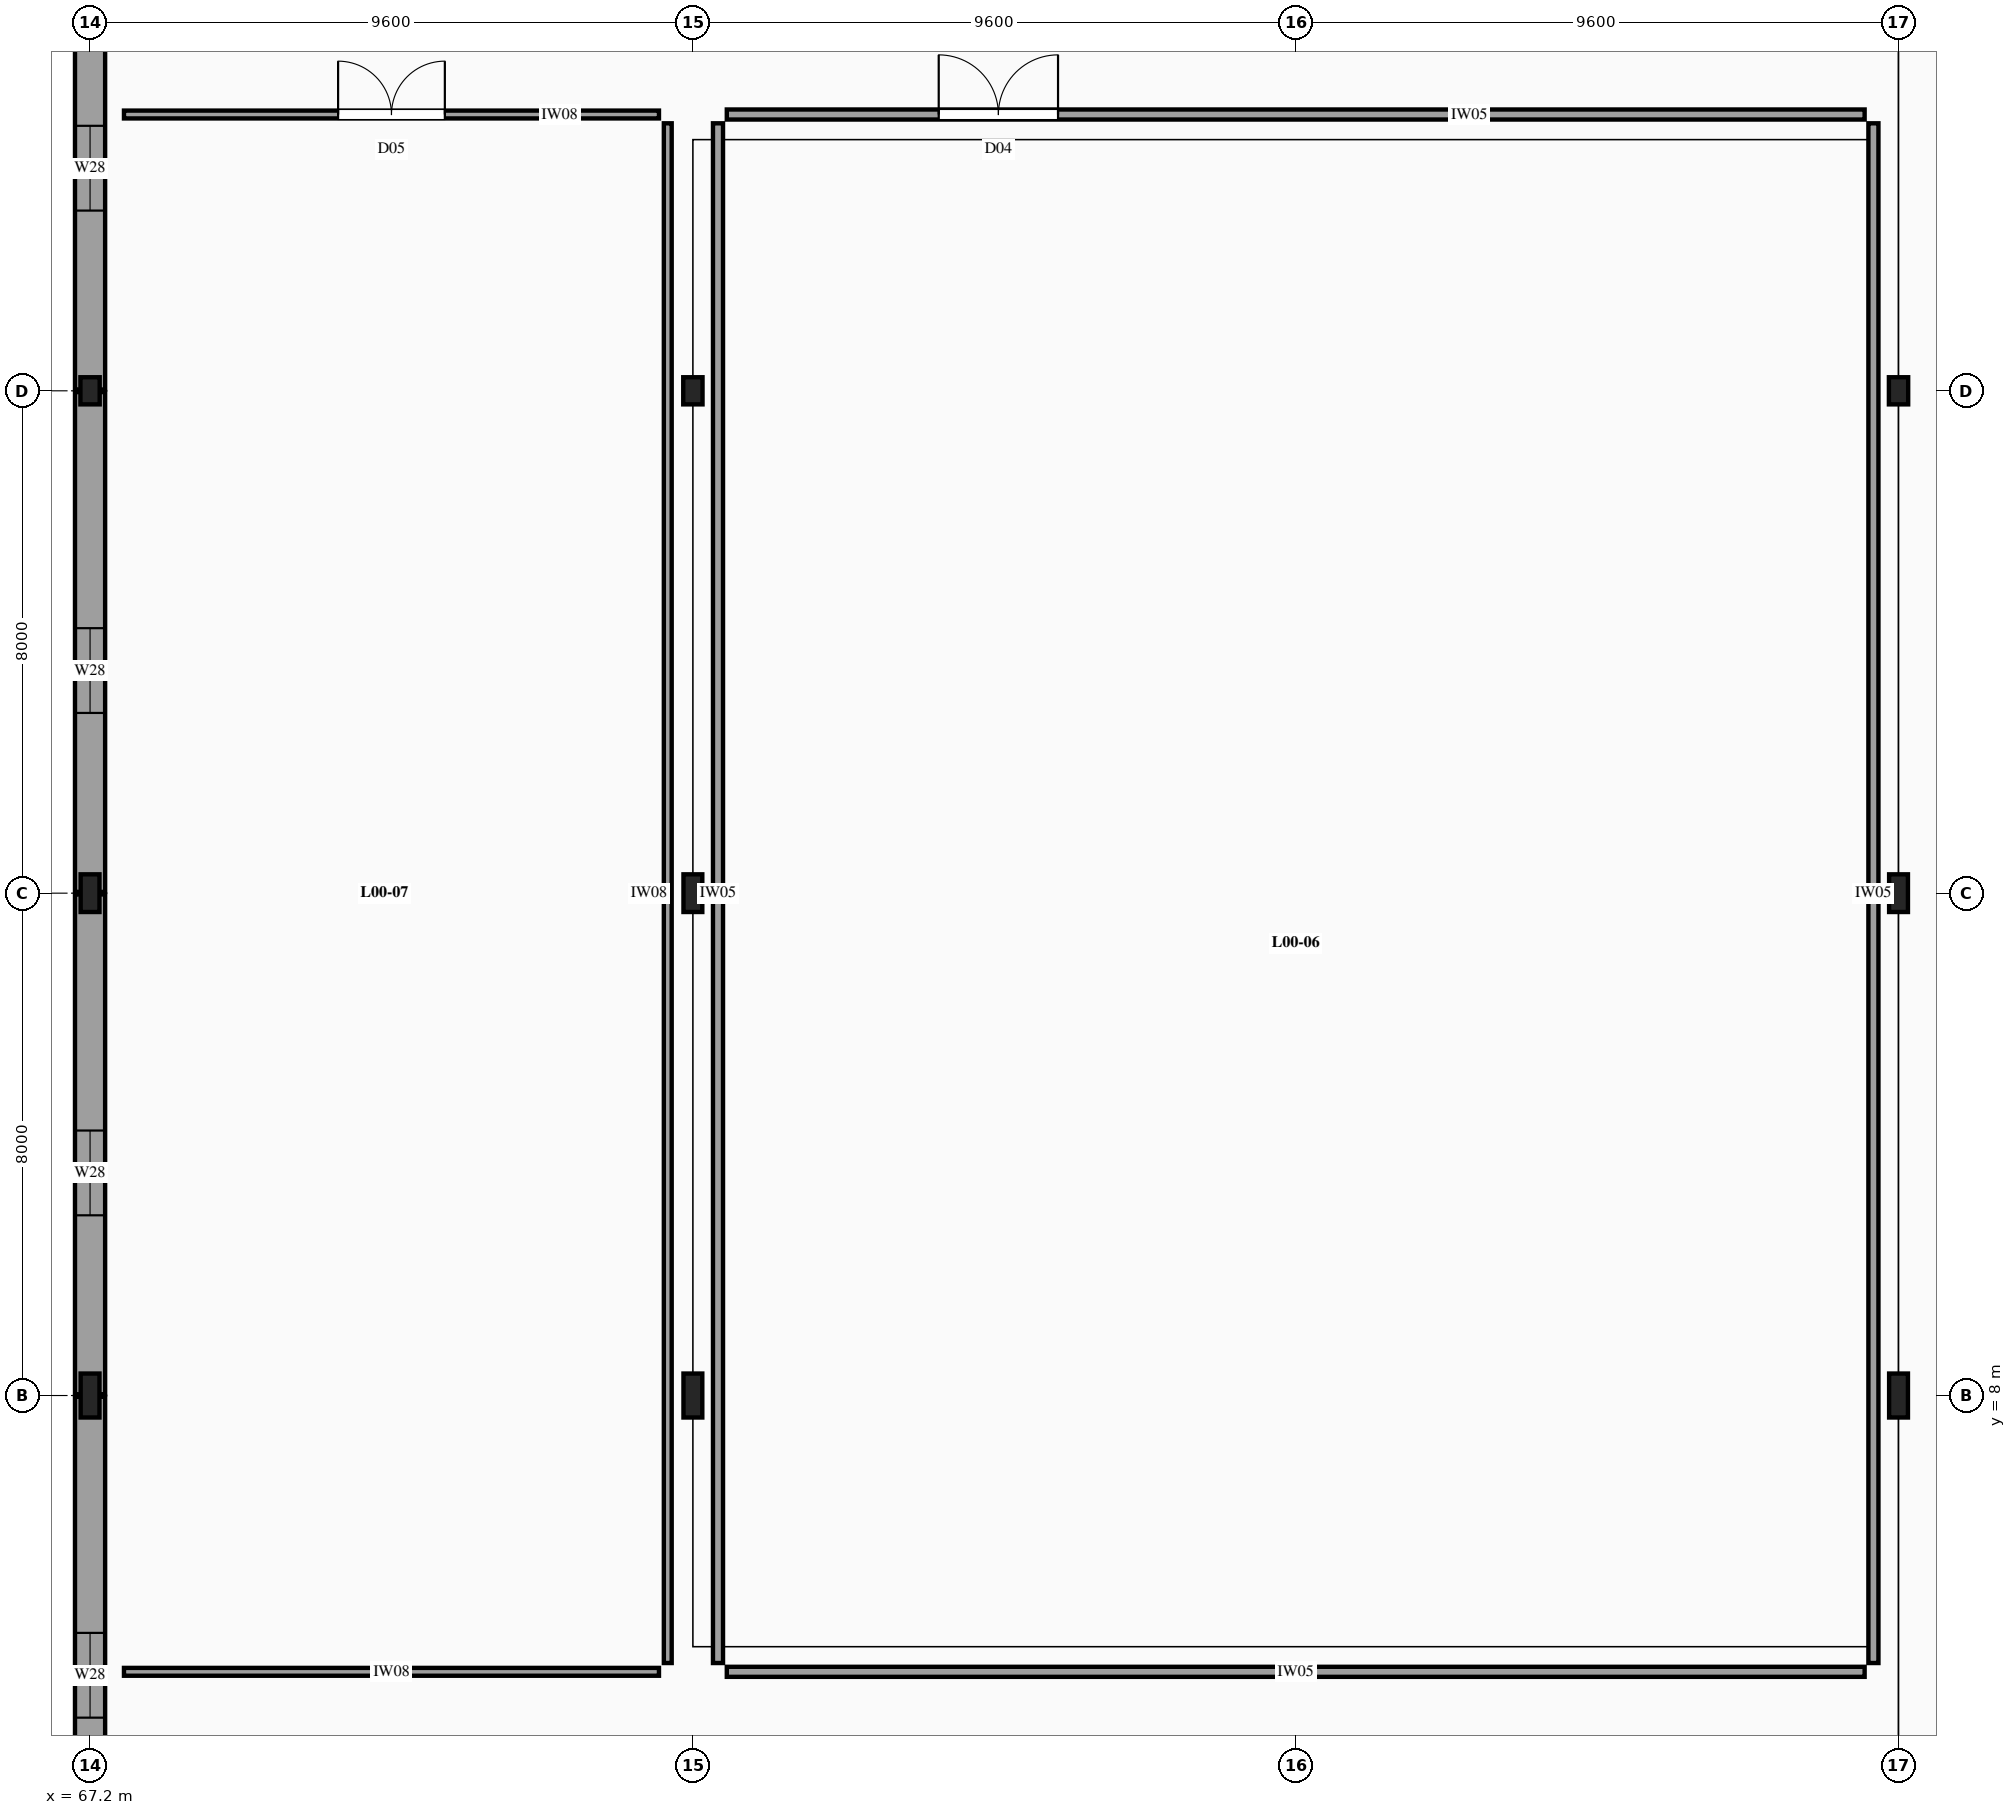
"""IFC4 building model, lengths in metres.
Left out: names, types, materials, properties, quantities, classifications, styles, units other than length and angle.
Written with IfcOpenShell. Run it as: python <this file> out.ifc"""

import sys

from ifc_helpers import new_model, si_unit, direction, frame, frame_2d, origin, origin_2d, place, context, subcontext, project, spatial, rectangle, i_section, extrude, element, fill, save


model = new_model("IFC4")
c1 = context("Model", 3, precision=1e-05, world=origin(), true_north=direction((0.0, 1.0)))
c2 = subcontext(c1, "Body", "Model", "MODEL_VIEW")
j1 = project(units=[si_unit("LENGTHUNIT", "METRE"), si_unit("PLANEANGLEUNIT", "RADIAN")], contexts=[c1])
p1 = place(None, origin())
s1 = spatial("IfcSite", under=j1, at=p1, CompositionType="ELEMENT")
p2 = place(p1, origin())
s2 = spatial("IfcBuilding", under=s1, at=p2, CompositionType="ELEMENT")
p3 = place(p2, origin())
s3 = spatial("IfcBuildingStorey", under=s2, at=p3, CompositionType="ELEMENT", Elevation=0.0)
p4 = place(p3, frame((67.2, 8.0, -0.28), z_axis=(0.0, 0.0, 1.0), x_axis=(1.0, 0.0, 0.0)))
e1 = element("IfcColumn", 1, at=p4, inside=s3, PredefinedType="COLUMN", context=c2, shape_type="SweptSolid", body=[
    extrude(i_section(OverallWidth=0.3, OverallDepth=0.7, WebThickness=0.017, FlangeThickness=0.032, FilletRadius=0.027, at=origin_2d()), origin(), (0.0, 0.0, 1.0), 4.52),
])
p5 = place(p3, frame((67.2, 16.0, -0.28), z_axis=(0.0, 0.0, 1.0), x_axis=(1.0, 0.0, 0.0)))
e2 = element("IfcColumn", 2, at=p5, inside=s3, PredefinedType="COLUMN", context=c2, shape_type="SweptSolid", body=[
    extrude(i_section(OverallWidth=0.3, OverallDepth=0.6, WebThickness=0.015, FlangeThickness=0.03, FilletRadius=0.027, at=origin_2d()), origin(), (0.0, 0.0, 1.0), 4.52),
])
p6 = place(p3, frame((67.2, 24.0, -0.28), z_axis=(0.0, 0.0, 1.0), x_axis=(1.0, 0.0, 0.0)))
e3 = element("IfcColumn", 3, at=p6, inside=s3, PredefinedType="COLUMN", context=c2, shape_type="SweptSolid", body=[
    extrude(i_section(OverallWidth=0.307, OverallDepth=0.432, WebThickness=0.021, FlangeThickness=0.04, FilletRadius=0.027, at=origin_2d()), origin(), (0.0, 0.0, 1.0), 4.52),
])
p7 = place(p3, frame((76.8, 8.0, -0.28), z_axis=(0.0, 0.0, 1.0), x_axis=(1.0, 0.0, 0.0)))
e4 = element("IfcColumn", 4, at=p7, inside=s3, PredefinedType="COLUMN", context=c2, shape_type="SweptSolid", body=[
    extrude(i_section(OverallWidth=0.3, OverallDepth=0.7, WebThickness=0.017, FlangeThickness=0.032, FilletRadius=0.027, at=origin_2d()), origin(), (0.0, 0.0, 1.0), 4.52),
])
p8 = place(p3, frame((76.8, 16.0, -0.28), z_axis=(0.0, 0.0, 1.0), x_axis=(1.0, 0.0, 0.0)))
e5 = element("IfcColumn", 5, at=p8, inside=s3, PredefinedType="COLUMN", context=c2, shape_type="SweptSolid", body=[
    extrude(i_section(OverallWidth=0.3, OverallDepth=0.6, WebThickness=0.015, FlangeThickness=0.03, FilletRadius=0.027, at=origin_2d()), origin(), (0.0, 0.0, 1.0), 4.52),
])
p9 = place(p3, frame((76.8, 24.0, -0.28), z_axis=(0.0, 0.0, 1.0), x_axis=(1.0, 0.0, 0.0)))
e6 = element("IfcColumn", 6, at=p9, inside=s3, PredefinedType="COLUMN", context=c2, shape_type="SweptSolid", body=[
    extrude(i_section(OverallWidth=0.307, OverallDepth=0.432, WebThickness=0.021, FlangeThickness=0.04, FilletRadius=0.027, at=origin_2d()), origin(), (0.0, 0.0, 1.0), 4.52),
])
p10 = place(p3, frame((96.0, 8.0, -0.28), z_axis=(0.0, 0.0, 1.0), x_axis=(1.0, 0.0, 0.0)))
e7 = element("IfcColumn", 7, at=p10, inside=s3, PredefinedType="COLUMN", context=c2, shape_type="SweptSolid", body=[
    extrude(i_section(OverallWidth=0.3, OverallDepth=0.7, WebThickness=0.017, FlangeThickness=0.032, FilletRadius=0.027, at=origin_2d()), origin(), (0.0, 0.0, 1.0), 4.52),
])
p11 = place(p3, frame((96.0, 16.0, -0.28), z_axis=(0.0, 0.0, 1.0), x_axis=(1.0, 0.0, 0.0)))
e8 = element("IfcColumn", 8, at=p11, inside=s3, PredefinedType="COLUMN", context=c2, shape_type="SweptSolid", body=[
    extrude(i_section(OverallWidth=0.3, OverallDepth=0.6, WebThickness=0.015, FlangeThickness=0.03, FilletRadius=0.027, at=origin_2d()), origin(), (0.0, 0.0, 1.0), 4.52),
])
p12 = place(p3, frame((96.0, 24.0, -0.28), z_axis=(0.0, 0.0, 1.0), x_axis=(1.0, 0.0, 0.0)))
e9 = element("IfcColumn", 9, at=p12, inside=s3, PredefinedType="COLUMN", context=c2, shape_type="SweptSolid", body=[
    extrude(i_section(OverallWidth=0.307, OverallDepth=0.432, WebThickness=0.021, FlangeThickness=0.04, FilletRadius=0.027, at=origin_2d()), origin(), (0.0, 0.0, 1.0), 4.52),
])
p13 = place(p3, frame((67.2, 0.02, 0.0), z_axis=(0.0, 0.0, 1.0), x_axis=(0.0, 1.0, 0.0)))
e10 = element("IfcWall", 10, at=p13, inside=s3, PredefinedType="SOLIDWALL", context=c2, shape_type="SweptSolid", body=[
    extrude(rectangle(XDim=7.96, YDim=0.48, at=frame_2d((3.98, 0.0))), origin(), (0.0, 0.0, 1.0), 3.56),
])
p14 = place(p13, frame((2.85, 0.0, 0.72)))
e11 = element("IfcOpeningElement", 11, at=p14, cuts=e10, PredefinedType="OPENING", context=c2, shape_type="SweptSolid", body=[
    extrude(rectangle(XDim=1.35, YDim=1.7, at=frame_2d((0.675, 0.85))), frame((0.0, 0.25, 0.0), z_axis=(0.0, -1.0, 0.0), x_axis=(1.0, 0.0, 0.0)), (0.0, 0.0, 1.0), 0.5),
])
p15 = place(p3, frame((67.2, 8.02, 0.0), z_axis=(0.0, 0.0, 1.0), x_axis=(0.0, 1.0, 0.0)))
e12 = element("IfcWall", 12, at=p15, inside=s3, PredefinedType="SOLIDWALL", context=c2, shape_type="SweptSolid", body=[
    extrude(rectangle(XDim=7.96, YDim=0.48, at=frame_2d((3.98, 0.0))), origin(), (0.0, 0.0, 1.0), 3.56),
])
p16 = place(p15, frame((2.85, 0.0, 0.72)))
e13 = element("IfcOpeningElement", 13, at=p16, cuts=e12, PredefinedType="OPENING", context=c2, shape_type="SweptSolid", body=[
    extrude(rectangle(XDim=1.35, YDim=1.7, at=frame_2d((0.675, 0.85))), frame((0.0, 0.25, 0.0), z_axis=(0.0, -1.0, 0.0), x_axis=(1.0, 0.0, 0.0)), (0.0, 0.0, 1.0), 0.5),
])
p17 = place(p3, frame((67.2, 16.02, 0.0), z_axis=(0.0, 0.0, 1.0), x_axis=(0.0, 1.0, 0.0)))
e14 = element("IfcWall", 14, at=p17, inside=s3, PredefinedType="SOLIDWALL", context=c2, shape_type="SweptSolid", body=[
    extrude(rectangle(XDim=7.96, YDim=0.48, at=frame_2d((3.98, 0.0))), origin(), (0.0, 0.0, 1.0), 3.56),
])
p18 = place(p17, frame((2.85, 0.0, 0.72)))
e15 = element("IfcOpeningElement", 15, at=p18, cuts=e14, PredefinedType="OPENING", context=c2, shape_type="SweptSolid", body=[
    extrude(rectangle(XDim=1.35, YDim=1.7, at=frame_2d((0.675, 0.85))), frame((0.0, 0.25, 0.0), z_axis=(0.0, -1.0, 0.0), x_axis=(1.0, 0.0, 0.0)), (0.0, 0.0, 1.0), 0.5),
])
p19 = place(p3, frame((67.2, 24.02, 0.0), z_axis=(0.0, 0.0, 1.0), x_axis=(0.0, 1.0, 0.0)))
e16 = element("IfcWall", 16, at=p19, inside=s3, PredefinedType="SOLIDWALL", context=c2, shape_type="SweptSolid", body=[
    extrude(rectangle(XDim=7.96, YDim=0.48, at=frame_2d((3.98, 0.0))), origin(), (0.0, 0.0, 1.0), 3.56),
])
p20 = place(p19, frame((2.85, 0.0, 0.72)))
e17 = element("IfcOpeningElement", 17, at=p20, cuts=e16, PredefinedType="OPENING", context=c2, shape_type="SweptSolid", body=[
    extrude(rectangle(XDim=1.35, YDim=1.7, at=frame_2d((0.675, 0.85))), frame((0.0, 0.25, 0.0), z_axis=(0.0, -1.0, 0.0), x_axis=(1.0, 0.0, 0.0)), (0.0, 0.0, 1.0), 0.5),
])
p21 = place(p3, frame((77.34, 28.4, 0.0), z_axis=(0.0, 0.0, 1.0), x_axis=(1.0, 0.0, 0.0)))
e18 = element("IfcWall", 18, at=p21, inside=s3, PredefinedType="PARTITIONING", context=c2, shape_type="SweptSolid", body=[
    extrude(rectangle(XDim=18.12, YDim=0.16, at=frame_2d((9.06, 0.0))), origin(), (0.0, 0.0, 1.0), 3.6),
])
p22 = place(p21, frame((3.375, 0.0, 0.0)))
e19 = element("IfcOpeningElement", 19, at=p22, cuts=e18, PredefinedType="OPENING", context=c2, shape_type="SweptSolid", body=[
    extrude(rectangle(XDim=1.9, YDim=2.4, at=frame_2d((0.95, 1.2))), frame((0.0, 0.09, 0.0), z_axis=(0.0, -1.0, 0.0), x_axis=(1.0, 0.0, 0.0)), (0.0, 0.0, 1.0), 0.18),
])
p23 = place(p3, frame((77.34, 3.6, 0.0), z_axis=(0.0, 0.0, 1.0), x_axis=(1.0, 0.0, 0.0)))
e20 = element("IfcWall", 20, at=p23, inside=s3, PredefinedType="PARTITIONING", context=c2, shape_type="SweptSolid", body=[
    extrude(rectangle(XDim=18.12, YDim=0.16, at=frame_2d((9.06, 0.0))), origin(), (0.0, 0.0, 1.0), 3.6),
])
for number, where, z_axis, x_axis in (
    (21, (77.2, 3.74, 0.0), (0.0, 0.0, 1.0), (0.0, 1.0, 0.0)),
    (22, (95.6, 3.74, 0.0), (0.0, 0.0, 1.0), (0.0, 1.0, 0.0)),
):
    element("IfcWall", number, at=place(p3, frame(where, z_axis=z_axis, x_axis=x_axis)), inside=s3, PredefinedType="PARTITIONING", context=c2, shape_type="SweptSolid", body=[
        extrude(rectangle(XDim=24.52, YDim=0.16, at=frame_2d((12.26, 0.0))), origin(), (0.0, 0.0, 1.0), 3.6),
    ])
p24 = place(p3, frame((67.74, 28.4, 0.0), z_axis=(0.0, 0.0, 1.0), x_axis=(1.0, 0.0, 0.0)))
e23 = element("IfcWall", 23, at=p24, inside=s3, PredefinedType="PARTITIONING", context=c2, shape_type="SweptSolid", body=[
    extrude(rectangle(XDim=8.52, YDim=0.125, at=frame_2d((4.26, 0.0))), origin(), (0.0, 0.0, 1.0), 3.6),
])
p25 = place(p24, frame((3.41, 0.0, 0.0)))
e24 = element("IfcOpeningElement", 24, at=p25, cuts=e23, PredefinedType="OPENING", context=c2, shape_type="SweptSolid", body=[
    extrude(rectangle(XDim=1.7, YDim=2.35, at=frame_2d((0.85, 1.175))), frame((0.0, 0.073, 0.0), z_axis=(0.0, -1.0, 0.0), x_axis=(1.0, 0.0, 0.0)), (0.0, 0.0, 1.0), 0.145),
])
p26 = place(p3, frame((67.74, 3.6, 0.0), z_axis=(0.0, 0.0, 1.0), x_axis=(1.0, 0.0, 0.0)))
e25 = element("IfcWall", 25, at=p26, inside=s3, PredefinedType="PARTITIONING", context=c2, shape_type="SweptSolid", body=[
    extrude(rectangle(XDim=8.52, YDim=0.125, at=frame_2d((4.26, 0.0))), origin(), (0.0, 0.0, 1.0), 3.6),
])
p27 = place(p3, frame((76.4, 3.74, 0.0), z_axis=(0.0, 0.0, 1.0), x_axis=(0.0, 1.0, 0.0)))
e26 = element("IfcWall", 26, at=p27, inside=s3, PredefinedType="PARTITIONING", context=c2, shape_type="SweptSolid", body=[
    extrude(rectangle(XDim=24.52, YDim=0.125, at=frame_2d((12.26, 0.0))), origin(), (0.0, 0.0, 1.0), 3.6),
])
p28 = place(p14, origin())
e27 = element("IfcWindow", 27, at=p28, inside=s3, PartitioningType="SINGLE_PANEL", PredefinedType="WINDOW", context=c2, shape_type="SweptSolid", body=[
    extrude(rectangle(XDim=1.35, YDim=1.7, at=frame_2d((0.675, 0.85))), frame((0.0, 0.03, 0.0), z_axis=(0.0, -1.0, 0.0), x_axis=(1.0, 0.0, 0.0)), (0.0, 0.0, 1.0), 0.06),
])
fill(e11, e27)
p29 = place(p16, origin())
e28 = element("IfcWindow", 28, at=p29, inside=s3, PartitioningType="SINGLE_PANEL", PredefinedType="WINDOW", context=c2, shape_type="SweptSolid", body=[
    extrude(rectangle(XDim=1.35, YDim=1.7, at=frame_2d((0.675, 0.85))), frame((0.0, 0.03, 0.0), z_axis=(0.0, -1.0, 0.0), x_axis=(1.0, 0.0, 0.0)), (0.0, 0.0, 1.0), 0.06),
])
fill(e13, e28)
p30 = place(p18, origin())
e29 = element("IfcWindow", 29, at=p30, inside=s3, PartitioningType="SINGLE_PANEL", PredefinedType="WINDOW", context=c2, shape_type="SweptSolid", body=[
    extrude(rectangle(XDim=1.35, YDim=1.7, at=frame_2d((0.675, 0.85))), frame((0.0, 0.03, 0.0), z_axis=(0.0, -1.0, 0.0), x_axis=(1.0, 0.0, 0.0)), (0.0, 0.0, 1.0), 0.06),
])
fill(e15, e29)
p31 = place(p20, origin())
e30 = element("IfcWindow", 30, at=p31, inside=s3, PartitioningType="SINGLE_PANEL", PredefinedType="WINDOW", context=c2, shape_type="SweptSolid", body=[
    extrude(rectangle(XDim=1.35, YDim=1.7, at=frame_2d((0.675, 0.85))), frame((0.0, 0.03, 0.0), z_axis=(0.0, -1.0, 0.0), x_axis=(1.0, 0.0, 0.0)), (0.0, 0.0, 1.0), 0.06),
])
fill(e17, e30)
p32 = place(p22, origin())
e31 = element("IfcDoor", 31, at=p32, inside=s3, OperationType="DOUBLE_DOOR_SINGLE_SWING", PredefinedType="DOOR", context=c2, shape_type="SweptSolid", body=[
    extrude(rectangle(XDim=1.9, YDim=2.4, at=frame_2d((0.95, 1.2))), frame((0.0, 0.025, 0.0), z_axis=(0.0, -1.0, 0.0), x_axis=(1.0, 0.0, 0.0)), (0.0, 0.0, 1.0), 0.05),
])
fill(e19, e31)
p33 = place(p25, origin())
e32 = element("IfcDoor", 32, at=p33, inside=s3, OperationType="DOUBLE_DOOR_SINGLE_SWING", PredefinedType="DOOR", context=c2, shape_type="SweptSolid", body=[
    extrude(rectangle(XDim=1.7, YDim=2.35, at=frame_2d((0.85, 1.175))), frame((0.0, 0.025, 0.0), z_axis=(0.0, -1.0, 0.0), x_axis=(1.0, 0.0, 0.0)), (0.0, 0.0, 1.0), 0.05),
])
fill(e24, e32)
save(model, sys.argv[1])
